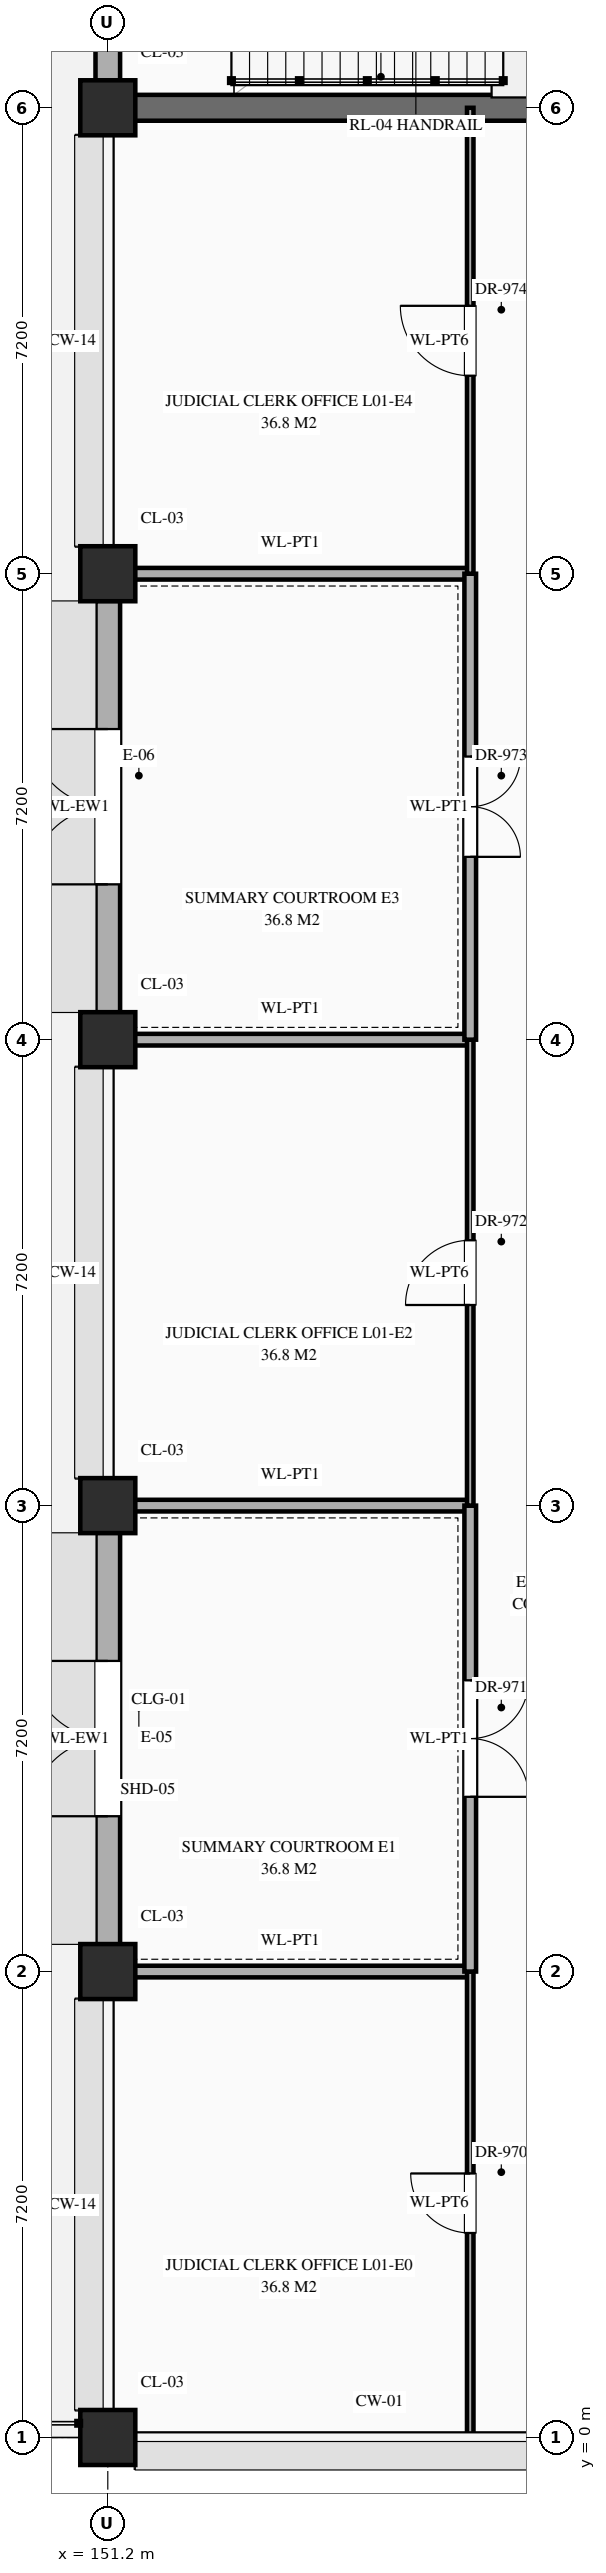
"""IFC4 building model, lengths in metres.
Left out: names, types, materials, properties, quantities, classifications, styles, units other than length and angle.
Written with IfcOpenShell. Run it as: python <this file> out.ifc"""

import sys

from ifc_helpers import new_model, si_unit, direction, frame, frame_2d, origin, origin_2d, place, context, subcontext, project, spatial, rectangle, extrude, element, fill, save


model = new_model("IFC4")
c1 = context("Model", 3, precision=1e-05, world=origin(), true_north=direction((0.0, 1.0)))
c2 = subcontext(c1, "Body", "Model", "MODEL_VIEW")
j1 = project(units=[si_unit("LENGTHUNIT", "METRE"), si_unit("PLANEANGLEUNIT", "RADIAN")], contexts=[c1])
p1 = place(None, origin())
s1 = spatial("IfcSite", under=j1, at=p1, CompositionType="ELEMENT")
p2 = place(p1, origin())
s2 = spatial("IfcBuilding", under=s1, at=p2, CompositionType="ELEMENT")
p3 = place(p2, origin())
s3 = spatial("IfcBuildingStorey", under=s2, at=p3, CompositionType="ELEMENT", Elevation=0.0)
for number, where, z_axis, x_axis in (
    (1, (151.2, 0.0, 0.0), (0.0, 0.0, 1.0), (1.0, 0.0, 0.0)),
    (2, (151.2, 7.2, 0.0), (0.0, 0.0, 1.0), (1.0, 0.0, 0.0)),
    (3, (151.2, 14.4, 0.0), (0.0, 0.0, 1.0), (1.0, 0.0, 0.0)),
    (4, (151.2, 21.6, 0.0), (0.0, 0.0, 1.0), (1.0, 0.0, 0.0)),
    (5, (151.2, 28.8, 0.0), (0.0, 0.0, 1.0), (1.0, 0.0, 0.0)),
    (6, (151.2, 36.0, 0.0), (0.0, 0.0, 1.0), (1.0, 0.0, 0.0)),
):
    element("IfcColumn", number, at=place(p3, frame(where, z_axis=z_axis, x_axis=x_axis)), inside=s3, PredefinedType="COLUMN", context=c2, shape_type="SweptSolid", body=[
        extrude(rectangle(XDim=0.85, YDim=0.85, at=origin_2d()), origin(), (0.0, 0.0, 1.0), 5.4),
    ])
p4 = place(p3, frame((151.2, 7.62, 0.0), z_axis=(0.0, 0.0, 1.0), x_axis=(0.0, 1.0, 0.0)))
e7 = element("IfcWall", 7, at=p4, inside=s3, PredefinedType="STANDARD", context=c2, shape_type="SweptSolid", body=[
    extrude(rectangle(XDim=6.36, YDim=0.38, at=frame_2d((3.18, 0.0))), origin(), (0.0, 0.0, 1.0), 4.47),
])
p5 = place(p4, frame((1.98, 0.0, 0.0)))
e8 = element("IfcOpeningElement", 8, at=p5, cuts=e7, PredefinedType="OPENING", context=c2, shape_type="SweptSolid", body=[
    extrude(rectangle(XDim=2.4, YDim=2.4, at=frame_2d((1.2, 1.2))), frame((0.0, 0.202, 0.0), z_axis=(0.0, -1.0, 0.0), x_axis=(1.0, 0.0, 0.0)), (0.0, 0.0, 1.0), 0.404),
])
p6 = place(p3, frame((151.2, 22.02, 0.0), z_axis=(0.0, 0.0, 1.0), x_axis=(0.0, 1.0, 0.0)))
e9 = element("IfcWall", 9, at=p6, inside=s3, PredefinedType="STANDARD", context=c2, shape_type="SweptSolid", body=[
    extrude(rectangle(XDim=6.36, YDim=0.38, at=frame_2d((3.18, 0.0))), origin(), (0.0, 0.0, 1.0), 4.47),
])
p7 = place(p6, frame((1.98, 0.0, 0.0)))
e10 = element("IfcOpeningElement", 10, at=p7, cuts=e9, PredefinedType="OPENING", context=c2, shape_type="SweptSolid", body=[
    extrude(rectangle(XDim=2.4, YDim=2.4, at=frame_2d((1.2, 1.2))), frame((0.0, 0.202, 0.0), z_axis=(0.0, -1.0, 0.0), x_axis=(1.0, 0.0, 0.0)), (0.0, 0.0, 1.0), 0.404),
])
p8 = place(p3, frame((151.2, 36.42, 0.0), z_axis=(0.0, 0.0, 1.0), x_axis=(0.0, 1.0, 0.0)))
e11 = element("IfcWall", 11, at=p8, inside=s3, PredefinedType="STANDARD", context=c2, shape_type="SweptSolid", body=[
    extrude(rectangle(XDim=6.36, YDim=0.38, at=frame_2d((3.18, 0.0))), origin(), (0.0, 0.0, 1.0), 4.47),
])
p9 = place(p8, frame((4.78, 0.0, 0.0)))
e12 = element("IfcOpeningElement", 12, at=p9, cuts=e11, PredefinedType="OPENING", context=c2, shape_type="SweptSolid", body=[
    extrude(rectangle(XDim=1.2, YDim=2.2, at=frame_2d((0.6, 1.1))), frame((0.0, 0.202, 0.0), z_axis=(0.0, -1.0, 0.0), x_axis=(1.0, 0.0, 0.0)), (0.0, 0.0, 1.0), 0.404),
])
for number, where, z_axis, x_axis in (
    (13, (151.24, 7.2, 0.0), (0.0, 0.0, 1.0), (1.0, 0.0, 0.0)),
    (14, (151.24, 14.4, 0.0), (0.0, 0.0, 1.0), (1.0, 0.0, 0.0)),
    (15, (151.24, 21.6, 0.0), (0.0, 0.0, 1.0), (1.0, 0.0, 0.0)),
    (16, (151.24, 28.8, 0.0), (0.0, 0.0, 1.0), (1.0, 0.0, 0.0)),
):
    element("IfcWall", number, at=place(p3, frame(where, z_axis=z_axis, x_axis=x_axis)), inside=s3, PredefinedType="STANDARD", context=c2, shape_type="SweptSolid", body=[
        extrude(rectangle(XDim=5.56, YDim=0.18, at=frame_2d((2.78, 0.0))), origin(), (0.0, 0.0, 1.0), 4.27),
    ])
p10 = place(p3, frame((151.24, 36.0, 0.0), z_axis=(0.0, 0.0, 1.0), x_axis=(1.0, 0.0, 0.0)))
e17 = element("IfcWall", 17, at=p10, inside=s3, PredefinedType="SHEAR", context=c2, shape_type="SweptSolid", body=[
    extrude(rectangle(XDim=8.36, YDim=0.4, at=frame_2d((4.18, 0.0))), origin(), (0.0, 0.0, 1.0), 5.12),
])
p11 = place(p3, frame((156.8, 0.04, 0.0), z_axis=(0.0, 0.0, 1.0), x_axis=(0.0, 1.0, 0.0)))
e18 = element("IfcWall", 18, at=p11, inside=s3, PredefinedType="STANDARD", context=c2, shape_type="SweptSolid", body=[
    extrude(rectangle(XDim=7.16, YDim=0.1, at=frame_2d((3.58, 0.0))), origin(), (0.0, 0.0, 1.0), 5.12),
])
p12 = place(p11, frame((3.12, 0.0, 0.0)))
e19 = element("IfcOpeningElement", 19, at=p12, cuts=e18, PredefinedType="OPENING", context=c2, shape_type="SweptSolid", body=[
    extrude(rectangle(XDim=0.92, YDim=2.15, at=frame_2d((0.46, 1.075))), frame((0.0, 0.062, 0.0), z_axis=(0.0, -1.0, 0.0), x_axis=(1.0, 0.0, 0.0)), (0.0, 0.0, 1.0), 0.124),
])
p13 = place(p3, frame((156.8, 7.2, 0.0), z_axis=(0.0, 0.0, 1.0), x_axis=(0.0, 1.0, 0.0)))
e20 = element("IfcWall", 20, at=p13, inside=s3, PredefinedType="STANDARD", context=c2, shape_type="SweptSolid", body=[
    extrude(rectangle(XDim=7.2, YDim=0.18, at=frame_2d((3.6, 0.0))), origin(), (0.0, 0.0, 1.0), 5.12),
])
p14 = place(p13, frame((2.7, 0.0, 0.0)))
e21 = element("IfcOpeningElement", 21, at=p14, cuts=e20, PredefinedType="OPENING", context=c2, shape_type="SweptSolid", body=[
    extrude(rectangle(XDim=1.8, YDim=2.5, at=frame_2d((0.9, 1.25))), frame((0.0, 0.102, 0.0), z_axis=(0.0, -1.0, 0.0), x_axis=(1.0, 0.0, 0.0)), (0.0, 0.0, 1.0), 0.204),
])
p15 = place(p3, frame((156.8, 14.4, 0.0), z_axis=(0.0, 0.0, 1.0), x_axis=(0.0, 1.0, 0.0)))
e22 = element("IfcWall", 22, at=p15, inside=s3, PredefinedType="STANDARD", context=c2, shape_type="SweptSolid", body=[
    extrude(rectangle(XDim=7.2, YDim=0.1, at=frame_2d((3.6, 0.0))), origin(), (0.0, 0.0, 1.0), 5.12),
])
p16 = place(p15, frame((3.1, 0.0, 0.0)))
e23 = element("IfcOpeningElement", 23, at=p16, cuts=e22, PredefinedType="OPENING", context=c2, shape_type="SweptSolid", body=[
    extrude(rectangle(XDim=1.0, YDim=2.25, at=frame_2d((0.5, 1.125))), frame((0.0, 0.062, 0.0), z_axis=(0.0, -1.0, 0.0), x_axis=(1.0, 0.0, 0.0)), (0.0, 0.0, 1.0), 0.124),
])
p17 = place(p3, frame((156.8, 21.6, 0.0), z_axis=(0.0, 0.0, 1.0), x_axis=(0.0, 1.0, 0.0)))
e24 = element("IfcWall", 24, at=p17, inside=s3, PredefinedType="STANDARD", context=c2, shape_type="SweptSolid", body=[
    extrude(rectangle(XDim=7.2, YDim=0.18, at=frame_2d((3.6, 0.0))), origin(), (0.0, 0.0, 1.0), 5.12),
])
p18 = place(p17, frame((2.825, 0.0, 0.0)))
e25 = element("IfcOpeningElement", 25, at=p18, cuts=e24, PredefinedType="OPENING", context=c2, shape_type="SweptSolid", body=[
    extrude(rectangle(XDim=1.55, YDim=2.35, at=frame_2d((0.775, 1.175))), frame((0.0, 0.102, 0.0), z_axis=(0.0, -1.0, 0.0), x_axis=(1.0, 0.0, 0.0)), (0.0, 0.0, 1.0), 0.204),
])
p19 = place(p3, frame((156.8, 28.8, 0.0), z_axis=(0.0, 0.0, 1.0), x_axis=(0.0, 1.0, 0.0)))
e26 = element("IfcWall", 26, at=p19, inside=s3, PredefinedType="STANDARD", context=c2, shape_type="SweptSolid", body=[
    extrude(rectangle(XDim=7.2, YDim=0.1, at=frame_2d((3.6, 0.0))), origin(), (0.0, 0.0, 1.0), 5.12),
])
p20 = place(p19, frame((3.06, 0.0, 0.0)))
e27 = element("IfcOpeningElement", 27, at=p20, cuts=e26, PredefinedType="OPENING", context=c2, shape_type="SweptSolid", body=[
    extrude(rectangle(XDim=1.08, YDim=2.25, at=frame_2d((0.54, 1.125))), frame((0.0, 0.062, 0.0), z_axis=(0.0, -1.0, 0.0), x_axis=(1.0, 0.0, 0.0)), (0.0, 0.0, 1.0), 0.124),
])
p21 = place(p5, origin())
e28 = element("IfcDoor", 28, at=p21, inside=s3, OperationType="DOUBLE_DOOR_SINGLE_SWING", PredefinedType="DOOR", context=c2, shape_type="SweptSolid", body=[
    extrude(rectangle(XDim=2.4, YDim=2.4, at=frame_2d((1.2, 1.2))), frame((0.0, 0.025, 0.0), z_axis=(0.0, -1.0, 0.0), x_axis=(1.0, 0.0, 0.0)), (0.0, 0.0, 1.0), 0.05),
])
fill(e8, e28)
p22 = place(p7, origin())
e29 = element("IfcDoor", 29, at=p22, inside=s3, OperationType="DOUBLE_DOOR_SINGLE_SWING", PredefinedType="DOOR", context=c2, shape_type="SweptSolid", body=[
    extrude(rectangle(XDim=2.4, YDim=2.4, at=frame_2d((1.2, 1.2))), frame((0.0, 0.025, 0.0), z_axis=(0.0, -1.0, 0.0), x_axis=(1.0, 0.0, 0.0)), (0.0, 0.0, 1.0), 0.05),
])
fill(e10, e29)
p23 = place(p12, origin())
e30 = element("IfcDoor", 30, at=p23, inside=s3, OperationType="SINGLE_SWING_RIGHT", PredefinedType="DOOR", context=c2, shape_type="SweptSolid", body=[
    extrude(rectangle(XDim=0.92, YDim=2.15, at=frame_2d((0.46, 1.075))), frame((0.0, 0.025, 0.0), z_axis=(0.0, -1.0, 0.0), x_axis=(1.0, 0.0, 0.0)), (0.0, 0.0, 1.0), 0.05),
])
fill(e19, e30)
p24 = place(p14, frame((1.8, 0.0, 0.0), z_axis=(0.0, 0.0, 1.0), x_axis=(-1.0, 0.0, 0.0)))
e31 = element("IfcDoor", 31, at=p24, inside=s3, OperationType="DOUBLE_DOOR_SINGLE_SWING", PredefinedType="DOOR", context=c2, shape_type="SweptSolid", body=[
    extrude(rectangle(XDim=1.8, YDim=2.5, at=frame_2d((0.9, 1.25))), frame((0.0, 0.025, 0.0), z_axis=(0.0, -1.0, 0.0), x_axis=(1.0, 0.0, 0.0)), (0.0, 0.0, 1.0), 0.05),
])
fill(e21, e31)
p25 = place(p16, origin())
e32 = element("IfcDoor", 32, at=p25, inside=s3, OperationType="SINGLE_SWING_LEFT", PredefinedType="DOOR", context=c2, shape_type="SweptSolid", body=[
    extrude(rectangle(XDim=1.0, YDim=2.25, at=frame_2d((0.5, 1.125))), frame((0.0, 0.025, 0.0), z_axis=(0.0, -1.0, 0.0), x_axis=(1.0, 0.0, 0.0)), (0.0, 0.0, 1.0), 0.05),
])
fill(e23, e32)
p26 = place(p18, frame((1.55, 0.0, 0.0), z_axis=(0.0, 0.0, 1.0), x_axis=(-1.0, 0.0, 0.0)))
e33 = element("IfcDoor", 33, at=p26, inside=s3, OperationType="DOUBLE_DOOR_SINGLE_SWING", PredefinedType="DOOR", context=c2, shape_type="SweptSolid", body=[
    extrude(rectangle(XDim=1.55, YDim=2.35, at=frame_2d((0.775, 1.175))), frame((0.0, 0.025, 0.0), z_axis=(0.0, -1.0, 0.0), x_axis=(1.0, 0.0, 0.0)), (0.0, 0.0, 1.0), 0.05),
])
fill(e25, e33)
p27 = place(p20, origin())
e34 = element("IfcDoor", 34, at=p27, inside=s3, OperationType="SINGLE_SWING_RIGHT", PredefinedType="DOOR", context=c2, shape_type="SweptSolid", body=[
    extrude(rectangle(XDim=1.08, YDim=2.25, at=frame_2d((0.54, 1.125))), frame((0.0, 0.025, 0.0), z_axis=(0.0, -1.0, 0.0), x_axis=(1.0, 0.0, 0.0)), (0.0, 0.0, 1.0), 0.05),
])
fill(e27, e34)
save(model, sys.argv[1])
